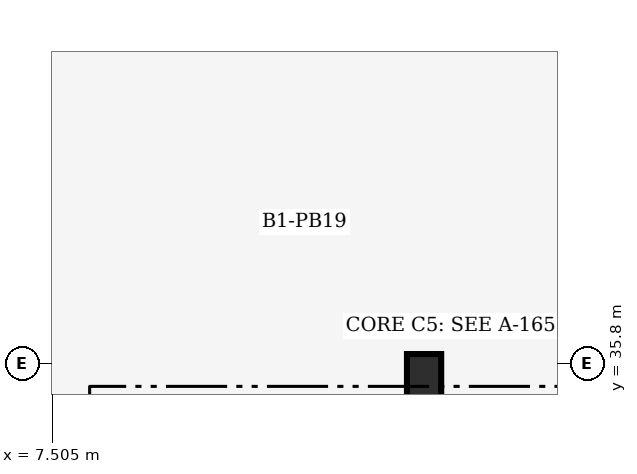
"""IFC4 building model, lengths in metres.
Left out: names, types, materials, properties, quantities, classifications, styles, units other than length and angle.
Written with IfcOpenShell. Run it as: python <this file> out.ifc"""

import sys

from ifc_helpers import new_model, si_unit, direction, frame, origin, origin_2d, place, context, subcontext, project, spatial, rectangle, extrude, element, save


model = new_model("IFC4")
c1 = context("Model", 3, precision=1e-05, world=origin(), true_north=direction((0.0, 1.0)))
c2 = subcontext(c1, "Body", "Model", "MODEL_VIEW")
j1 = project(units=[si_unit("LENGTHUNIT", "METRE"), si_unit("PLANEANGLEUNIT", "RADIAN")], contexts=[c1])
p1 = place(None, origin())
s1 = spatial("IfcSite", under=j1, at=p1, CompositionType="ELEMENT")
p2 = place(p1, origin())
s2 = spatial("IfcBuilding", under=s1, at=p2, CompositionType="ELEMENT")
p3 = place(p2, frame((0.0, 0.0, -4.8)))
s3 = spatial("IfcBuildingStorey", under=s2, at=p3, CompositionType="ELEMENT", Elevation=-4.8)
p4 = place(p3, frame((12.4, 35.5, 0.0), z_axis=(0.0, 0.0, 1.0), x_axis=(1.0, 0.0, 0.0)))
e1 = element("IfcColumn", 1, at=p4, inside=s3, PredefinedType="PILASTER", context=c2, shape_type="SweptSolid", body=[
    extrude(rectangle(XDim=0.45, YDim=0.85, at=origin_2d()), origin(), (0.0, 0.0, 1.0), 4.8),
])
save(model, sys.argv[1])
